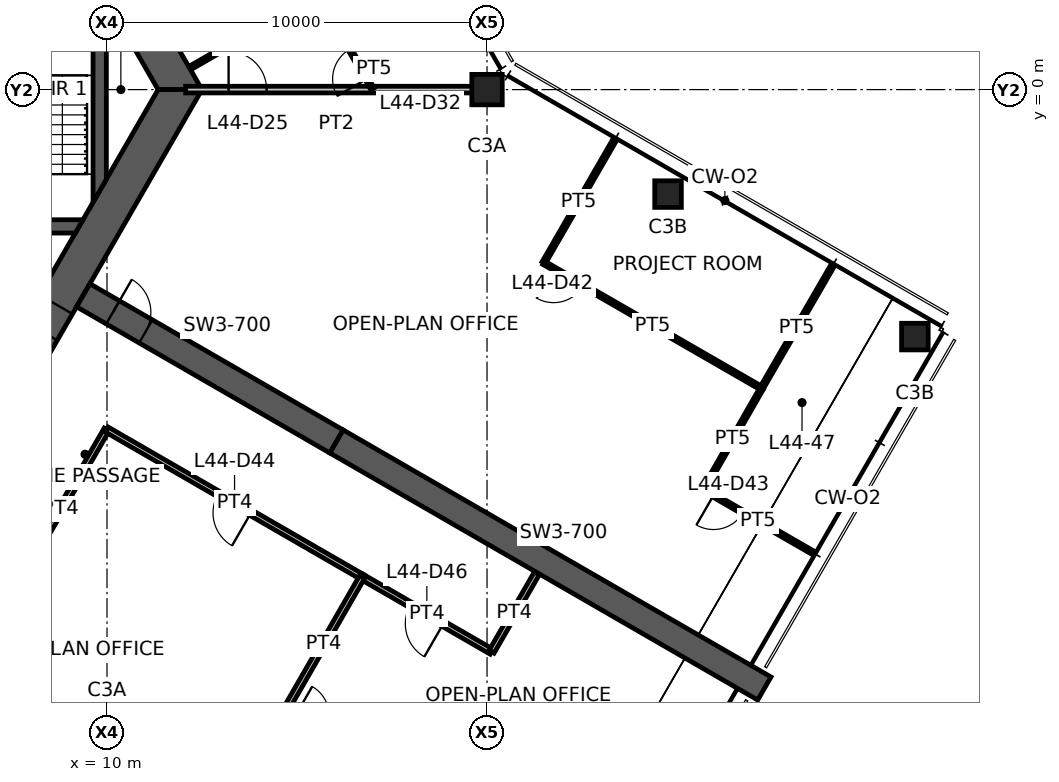
"""IFC4 building model, lengths in metres.
Left out: names, types, materials, properties, quantities, classifications, styles, units other than length and angle.
Written with IfcOpenShell. Run it as: python <this file> out.ifc"""

import sys

from ifc_helpers import new_model, si_unit, direction, frame, frame_2d, origin, origin_2d, place, context, subcontext, project, spatial, polyline, rectangle, hollow_rectangle, outline, extrude, element, fill, save


model = new_model("IFC4")
c1 = context("Model", 3, precision=1e-05, world=origin(), true_north=direction((0.0, 1.0)))
c2 = subcontext(c1, "Body", "Model", "MODEL_VIEW")
j1 = project(units=[si_unit("LENGTHUNIT", "METRE"), si_unit("PLANEANGLEUNIT", "RADIAN")], contexts=[c1])
p1 = place(None, origin())
s1 = spatial("IfcSite", under=j1, at=p1, CompositionType="ELEMENT")
p2 = place(p1, origin())
s2 = spatial("IfcBuilding", under=s1, at=p2, CompositionType="ELEMENT")
p3 = place(p2, frame((0.0, 0.0, 176.0)))
s3 = spatial("IfcBuildingStorey", under=s2, at=p3, CompositionType="ELEMENT", Elevation=176.0)
p4 = place(p3, frame((20.0, 0.0, 0.0), z_axis=(0.0, 0.0, 1.0), x_axis=(1.0, 0.0, 0.0)))
e1 = element("IfcColumn", 1, at=p4, inside=s3, PredefinedType="COLUMN", context=c2, shape_type="SweptSolid", body=[
    extrude(hollow_rectangle(XDim=0.8, YDim=0.8, WallThickness=0.045, at=origin_2d()), origin(), (0.0, 0.0, 1.0), 3.9),
])
for number, where, z_axis, x_axis in (
    (2, (24.763, -2.75, 0.0), (0.0, 0.0, 1.0), (1.0, 0.0, 0.0)),
    (3, (31.258, -6.5, 0.0), (0.0, 0.0, 1.0), (1.0, 0.0, 0.0)),
):
    element("IfcColumn", number, at=place(p3, frame(where, z_axis=z_axis, x_axis=x_axis)), inside=s3, PredefinedType="COLUMN", context=c2, shape_type="SweptSolid", body=[
        extrude(hollow_rectangle(XDim=0.7, YDim=0.7, WallThickness=0.036, at=origin_2d()), origin(), (0.0, 0.0, 1.0), 3.9),
    ])
p5 = place(p3, frame((11.922, 0.0, 0.0), z_axis=(0.0, 0.0, 1.0), x_axis=(-0.500004296715, 0.866022923061, 0.0)))
e4 = element("IfcWall", 4, at=p5, inside=s3, PredefinedType="SHEAR", context=c2, shape_type="SweptSolid", body=[
    extrude(outline(polyline([(-0.289, -0.5), (5.835, -0.5), (6.635, -0.5), (12.211, -0.5), (11.634, 0.5), (6.635, 0.5), (5.835, 0.5), (0.289, 0.5), (-0.289, -0.5)])), origin(), (0.0, 0.0, 1.0), 3.9),
])
p6 = place(p5, frame((5.835, 0.0, 0.0)))
e5 = element("IfcOpeningElement", 5, at=p6, cuts=e4, PredefinedType="OPENING", context=c2, shape_type="SweptSolid", body=[
    extrude(rectangle(XDim=0.8, YDim=2.1, at=frame_2d((0.4, 1.05))), frame((0.0, 0.51, 0.0), z_axis=(0.0, -1.0, 0.0), x_axis=(1.0, 0.0, 0.0)), (0.0, 0.0, 1.0), 1.02),
])
p7 = place(p3, frame((5.961, -10.325, 0.0), z_axis=(0.0, 0.0, 1.0), x_axis=(0.500004296715, 0.866022923061, 0.0)))
e6 = element("IfcWall", 6, at=p7, inside=s3, PredefinedType="SHEAR", context=c2, shape_type="SweptSolid", body=[
    extrude(outline(polyline([(-0.289, -0.5), (4.594, -0.5), (5.394, -0.5), (12.211, -0.5), (11.634, 0.5), (5.394, 0.5), (4.594, 0.5), (0.289, 0.5), (-0.289, -0.5)])), origin(), (0.0, 0.0, 1.0), 3.9),
])
p8 = place(p7, frame((4.594, 0.0, 0.0)))
e7 = element("IfcOpeningElement", 7, at=p8, cuts=e6, PredefinedType="OPENING", context=c2, shape_type="SweptSolid", body=[
    extrude(rectangle(XDim=0.8, YDim=2.1, at=frame_2d((0.4, 1.05))), frame((0.0, 0.51, 0.0), z_axis=(0.0, -1.0, 0.0), x_axis=(1.0, 0.0, 0.0)), (0.0, 0.0, 1.0), 1.02),
])
p9 = place(p3, frame((9.375, -5.413, 0.0), z_axis=(0.0, 0.0, 1.0), x_axis=(0.866032377459, -0.499987921047, 0.0)))
e8 = element("IfcWall", 8, at=p9, inside=s3, PredefinedType="SHEAR", context=c2, shape_type="SweptSolid", body=[
    extrude(rectangle(XDim=7.696, YDim=0.7, at=frame_2d((3.848, 0.0))), origin(), (0.0, 0.0, 1.0), 3.9),
])
p10 = place(p9, frame((0.9, 0.0, 0.0)))
e9 = element("IfcOpeningElement", 9, at=p10, cuts=e8, PredefinedType="OPENING", context=c2, shape_type="SweptSolid", body=[
    extrude(rectangle(XDim=1.0, YDim=2.1, at=frame_2d((0.5, 1.05))), frame((0.0, 0.36, 0.0), z_axis=(0.0, -1.0, 0.0), x_axis=(1.0, 0.0, 0.0)), (0.0, 0.0, 1.0), 0.72),
])
p11 = place(p3, frame((16.039, -9.26, 0.0), z_axis=(0.0, 0.0, 1.0), x_axis=(0.866024837091, -0.50000098154, 0.0)))
e10 = element("IfcWall", 10, at=p11, inside=s3, PredefinedType="SHEAR", context=c2, shape_type="SweptSolid", body=[
    extrude(rectangle(XDim=13.0, YDim=0.7, at=frame_2d((6.5, 0.0))), origin(), (0.0, 0.0, 1.0), 3.9),
])
p12 = place(p3, frame((1.425, -3.6, 0.0), z_axis=(0.0, 0.0, 1.0), x_axis=(1.0, 0.0, 0.0)))
e11 = element("IfcWall", 11, at=p12, inside=s3, PredefinedType="SHEAR", context=c2, shape_type="SweptSolid", body=[
    extrude(outline(polyline([(0.0, -0.175), (1.075, -0.175), (2.175, -0.175), (7.74, -0.175), (7.942, 0.175), (2.175, 0.175), (1.075, 0.175), (0.0, 0.175), (0.0, -0.175)])), origin(), (0.0, 0.0, 1.0), 3.9),
])
p13 = place(p12, frame((1.075, 0.0, 0.0)))
e12 = element("IfcOpeningElement", 12, at=p13, cuts=e11, PredefinedType="OPENING", context=c2, shape_type="SweptSolid", body=[
    extrude(rectangle(XDim=1.1, YDim=2.1, at=frame_2d((0.55, 1.05))), frame((0.0, 0.185, 0.0), z_axis=(0.0, -1.0, 0.0), x_axis=(1.0, 0.0, 0.0)), (0.0, 0.0, 1.0), 0.37),
])
p14 = place(p3, frame((9.808, -2.662, 0.0), z_axis=(0.0, 0.0, 1.0), x_axis=(0.0, 1.0, 0.0)))
e13 = element("IfcWall", 13, at=p14, inside=s3, PredefinedType="SHEAR", context=c2, shape_type="SweptSolid", body=[
    extrude(outline(polyline([(0.303, -0.175), (5.021, -0.175), (5.628, 0.175), (-0.303, 0.175), (0.303, -0.175)])), origin(), (0.0, 0.0, 1.0), 3.9),
])
p15 = place(p3, frame((12.07, 0.0, 0.0), z_axis=(0.0, 0.0, 1.0), x_axis=(1.0, 0.0, 0.0)))
e14 = element("IfcWall", 14, at=p15, inside=s3, PredefinedType="PARTITIONING", context=c2, shape_type="SweptSolid", body=[
    extrude(rectangle(XDim=7.93, YDim=0.175, at=frame_2d((3.965, 0.0))), origin(), (0.0, 0.0, 1.0), 3.05),
])
p16 = place(p15, frame((1.13, 0.0, 0.0)))
e15 = element("IfcOpeningElement", 15, at=p16, cuts=e14, PredefinedType="OPENING", context=c2, shape_type="SweptSolid", body=[
    extrude(rectangle(XDim=1.0, YDim=2.1, at=frame_2d((0.5, 1.05))), frame((0.0, 0.098, 0.0), z_axis=(0.0, -1.0, 0.0), x_axis=(1.0, 0.0, 0.0)), (0.0, 0.0, 1.0), 0.195),
])
p17 = place(p3, frame((14.427, 1.863, 0.0), z_axis=(0.0, 0.0, 1.0), x_axis=(-0.866045356598, -0.49996543912, 0.0)))
e16 = element("IfcWall", 16, at=p17, inside=s3, PredefinedType="PARTITIONING", context=c2, shape_type="SweptSolid", body=[
    extrude(rectangle(XDim=2.58, YDim=0.1, at=frame_2d((1.29, 0.0))), origin(), (0.0, 0.0, 1.0), 2.95),
])
p18 = place(p3, frame((16.986, 0.02, 0.0), z_axis=(0.0, 0.0, 1.0), x_axis=(-0.498096123952, 0.867121820337, 0.0)))
e17 = element("IfcWall", 17, at=p18, inside=s3, PredefinedType="PARTITIONING", context=c2, shape_type="SweptSolid", body=[
    extrude(rectangle(XDim=2.067, YDim=0.1, at=frame_2d((1.034, 0.0))), origin(), (0.0, 0.0, 1.0), 2.95),
])
p19 = place(p18, frame((0.3, 0.0, 0.0)))
e18 = element("IfcOpeningElement", 18, at=p19, cuts=e17, PredefinedType="OPENING", context=c2, shape_type="SweptSolid", body=[
    extrude(rectangle(XDim=0.9, YDim=2.1, at=frame_2d((0.45, 1.05))), frame((0.0, 0.06, 0.0), z_axis=(0.0, -1.0, 0.0), x_axis=(1.0, 0.0, 0.0)), (0.0, 0.0, 1.0), 0.12),
])
p20 = place(p3, frame((29.077, -4.658, 0.0), z_axis=(0.0, 0.0, 1.0), x_axis=(-0.501275229052, -0.865287897026, 0.0)))
e19 = element("IfcWall", 19, at=p20, inside=s3, PredefinedType="PARTITIONING", context=c2, shape_type="SweptSolid", body=[
    extrude(rectangle(XDim=3.705, YDim=0.1, at=frame_2d((1.853, 0.0))), origin(), (0.0, 0.0, 1.0), 2.95),
])
p21 = place(p3, frame((21.492, -4.557, 0.0), z_axis=(0.0, 0.0, 1.0), x_axis=(0.500013413428, 0.866017659399, 0.0)))
e20 = element("IfcWall", 20, at=p21, inside=s3, PredefinedType="PARTITIONING", context=c2, shape_type="SweptSolid", body=[
    extrude(rectangle(XDim=3.68, YDim=0.1, at=frame_2d((1.84, 0.0))), origin(), (0.0, 0.0, 1.0), 2.95),
])
p22 = place(p3, frame((27.227, -7.863, 0.0), z_axis=(0.0, 0.0, 1.0), x_axis=(-0.866343956507, 0.499447844147, 0.0)))
e21 = element("IfcWall", 21, at=p22, inside=s3, PredefinedType="PARTITIONING", context=c2, shape_type="SweptSolid", body=[
    extrude(rectangle(XDim=6.62, YDim=0.1, at=frame_2d((3.31, 0.0))), origin(), (0.0, 0.0, 1.0), 2.95),
])
p23 = place(p22, frame((5.42, 0.0, 0.0)))
e22 = element("IfcOpeningElement", 22, at=p23, cuts=e21, PredefinedType="OPENING", context=c2, shape_type="SweptSolid", body=[
    extrude(rectangle(XDim=0.9, YDim=2.1, at=frame_2d((0.45, 1.05))), frame((0.0, 0.06, 0.0), z_axis=(0.0, -1.0, 0.0), x_axis=(1.0, 0.0, 0.0)), (0.0, 0.0, 1.0), 0.12),
])
p24 = place(p3, frame((25.7, -10.527, 0.0), z_axis=(0.0, 0.0, 1.0), x_axis=(0.497097650811, 0.867694603855, 0.0)))
e23 = element("IfcWall", 23, at=p24, inside=s3, PredefinedType="PARTITIONING", context=c2, shape_type="SweptSolid", body=[
    extrude(rectangle(XDim=3.071, YDim=0.1, at=frame_2d((1.535, 0.0))), origin(), (0.0, 0.0, 1.0), 2.95),
])
p25 = place(p3, frame((28.562, -12.18, 0.0), z_axis=(0.0, 0.0, 1.0), x_axis=(-0.866020751647, 0.500008057651, 0.0)))
e24 = element("IfcWall", 24, at=p25, inside=s3, PredefinedType="PARTITIONING", context=c2, shape_type="SweptSolid", body=[
    extrude(rectangle(XDim=3.305, YDim=0.1, at=frame_2d((1.653, 0.0))), origin(), (0.0, 0.0, 1.0), 2.95),
])
p26 = place(p25, frame((2.105, 0.0, 0.0)))
e25 = element("IfcOpeningElement", 25, at=p26, cuts=e24, PredefinedType="OPENING", context=c2, shape_type="SweptSolid", body=[
    extrude(rectangle(XDim=0.9, YDim=2.1, at=frame_2d((0.45, 1.05))), frame((0.0, 0.06, 0.0), z_axis=(0.0, -1.0, 0.0), x_axis=(1.0, 0.0, 0.0)), (0.0, 0.0, 1.0), 0.12),
])
p27 = place(p3, frame((9.992, -8.944, 0.0), z_axis=(0.0, 0.0, 1.0), x_axis=(-0.500033248206, -0.866006207073, 0.0)))
e26 = element("IfcWall", 26, at=p27, inside=s3, PredefinedType="PARTITIONING", context=c2, shape_type="SweptSolid", body=[
    extrude(rectangle(XDim=4.828, YDim=0.15, at=frame_2d((2.414, 0.0))), origin(), (0.0, 0.0, 1.0), 2.95),
])
p28 = place(p3, frame((16.721, -12.83, 0.0), z_axis=(0.0, 0.0, 1.0), x_axis=(-0.866020780657, 0.500008007406, 0.0)))
e27 = element("IfcWall", 27, at=p28, inside=s3, PredefinedType="PARTITIONING", context=c2, shape_type="SweptSolid", body=[
    extrude(rectangle(XDim=7.771, YDim=0.15, at=frame_2d((3.885, 0.0))), origin(), (0.0, 0.0, 1.0), 2.95),
])
p29 = place(p28, frame((3.385, 0.0, 0.0)))
e28 = element("IfcOpeningElement", 28, at=p29, cuts=e27, PredefinedType="OPENING", context=c2, shape_type="SweptSolid", body=[
    extrude(rectangle(XDim=1.0, YDim=2.1, at=frame_2d((0.5, 1.05))), frame((0.0, 0.085, 0.0), z_axis=(0.0, -1.0, 0.0), x_axis=(1.0, 0.0, 0.0)), (0.0, 0.0, 1.0), 0.17),
])
p30 = place(p3, frame((20.12, -14.792, 0.0), z_axis=(0.0, 0.0, 1.0), x_axis=(-0.866038848349, 0.499976712608, 0.0)))
e29 = element("IfcWall", 29, at=p30, inside=s3, PredefinedType="PARTITIONING", context=c2, shape_type="SweptSolid", body=[
    extrude(rectangle(XDim=3.934, YDim=0.15, at=frame_2d((1.967, 0.0))), origin(), (0.0, 0.0, 1.0), 2.95),
])
p31 = place(p30, frame((1.467, 0.0, 0.0)))
e30 = element("IfcOpeningElement", 30, at=p31, cuts=e29, PredefinedType="OPENING", context=c2, shape_type="SweptSolid", body=[
    extrude(rectangle(XDim=1.0, YDim=2.1, at=frame_2d((0.5, 1.05))), frame((0.0, 0.085, 0.0), z_axis=(0.0, -1.0, 0.0), x_axis=(1.0, 0.0, 0.0)), (0.0, 0.0, 1.0), 0.17),
])
p32 = place(p3, frame((21.31, -12.731, 0.0), z_axis=(0.0, 0.0, 1.0), x_axis=(-0.500077627542, -0.865980580863, 0.0)))
e31 = element("IfcWall", 31, at=p32, inside=s3, PredefinedType="PARTITIONING", context=c2, shape_type="SweptSolid", body=[
    extrude(rectangle(XDim=2.38, YDim=0.15, at=frame_2d((1.19, 0.0))), origin(), (0.0, 0.0, 1.0), 2.95),
])
p33 = place(p3, frame((16.713, -12.825, 0.0), z_axis=(0.0, 0.0, 1.0), x_axis=(-0.498976779382, -0.866615355067, 0.0)))
e32 = element("IfcWall", 32, at=p33, inside=s3, PredefinedType="PARTITIONING", context=c2, shape_type="SweptSolid", body=[
    extrude(rectangle(XDim=4.054, YDim=0.15, at=frame_2d((2.027, 0.0))), origin(), (0.0, 0.0, 1.0), 2.95),
])
p34 = place(p8, origin())
e33 = element("IfcDoor", 33, at=p34, inside=s3, OperationType="SINGLE_SWING_LEFT", PredefinedType="DOOR", context=c2, shape_type="SweptSolid", body=[
    extrude(rectangle(XDim=0.8, YDim=2.1, at=frame_2d((0.4, 1.05))), frame((0.0, 0.025, 0.0), z_axis=(0.0, -1.0, 0.0), x_axis=(1.0, 0.0, 0.0)), (0.0, 0.0, 1.0), 0.05),
])
fill(e7, e33)
p35 = place(p10, origin())
e34 = element("IfcDoor", 34, at=p35, inside=s3, OperationType="SINGLE_SWING_LEFT", PredefinedType="DOOR", context=c2, shape_type="SweptSolid", body=[
    extrude(rectangle(XDim=1.0, YDim=2.1, at=frame_2d((0.5, 1.05))), frame((0.0, 0.025, 0.0), z_axis=(0.0, -1.0, 0.0), x_axis=(1.0, 0.0, 0.0)), (0.0, 0.0, 1.0), 0.05),
])
fill(e9, e34)
p36 = place(p16, origin())
e35 = element("IfcDoor", 35, at=p36, inside=s3, OperationType="SINGLE_SWING_LEFT", PredefinedType="DOOR", context=c2, shape_type="SweptSolid", body=[
    extrude(rectangle(XDim=1.0, YDim=2.1, at=frame_2d((0.5, 1.05))), frame((0.0, 0.025, 0.0), z_axis=(0.0, -1.0, 0.0), x_axis=(1.0, 0.0, 0.0)), (0.0, 0.0, 1.0), 0.05),
])
fill(e15, e35)
p37 = place(p19, origin())
e36 = element("IfcDoor", 36, at=p37, inside=s3, OperationType="SINGLE_SWING_LEFT", PredefinedType="DOOR", context=c2, shape_type="SweptSolid", body=[
    extrude(rectangle(XDim=0.9, YDim=2.1, at=frame_2d((0.45, 1.05))), frame((0.0, 0.025, 0.0), z_axis=(0.0, -1.0, 0.0), x_axis=(1.0, 0.0, 0.0)), (0.0, 0.0, 1.0), 0.05),
])
fill(e18, e36)
p38 = place(p23, origin())
e37 = element("IfcDoor", 37, at=p38, inside=s3, OperationType="SINGLE_SWING_RIGHT", PredefinedType="DOOR", context=c2, shape_type="SweptSolid", body=[
    extrude(rectangle(XDim=0.9, YDim=2.1, at=frame_2d((0.45, 1.05))), frame((0.0, 0.025, 0.0), z_axis=(0.0, -1.0, 0.0), x_axis=(1.0, 0.0, 0.0)), (0.0, 0.0, 1.0), 0.05),
])
fill(e22, e37)
p39 = place(p26, origin())
e38 = element("IfcDoor", 38, at=p39, inside=s3, OperationType="SINGLE_SWING_RIGHT", PredefinedType="DOOR", context=c2, shape_type="SweptSolid", body=[
    extrude(rectangle(XDim=0.9, YDim=2.1, at=frame_2d((0.45, 1.05))), frame((0.0, 0.025, 0.0), z_axis=(0.0, -1.0, 0.0), x_axis=(1.0, 0.0, 0.0)), (0.0, 0.0, 1.0), 0.05),
])
fill(e25, e38)
p40 = place(p29, origin())
e39 = element("IfcDoor", 39, at=p40, inside=s3, OperationType="SINGLE_SWING_LEFT", PredefinedType="DOOR", context=c2, shape_type="SweptSolid", body=[
    extrude(rectangle(XDim=1.0, YDim=2.1, at=frame_2d((0.5, 1.05))), frame((0.0, 0.025, 0.0), z_axis=(0.0, -1.0, 0.0), x_axis=(1.0, 0.0, 0.0)), (0.0, 0.0, 1.0), 0.05),
])
fill(e28, e39)
p41 = place(p31, origin())
e40 = element("IfcDoor", 40, at=p41, inside=s3, OperationType="SINGLE_SWING_LEFT", PredefinedType="DOOR", context=c2, shape_type="SweptSolid", body=[
    extrude(rectangle(XDim=1.0, YDim=2.1, at=frame_2d((0.5, 1.05))), frame((0.0, 0.025, 0.0), z_axis=(0.0, -1.0, 0.0), x_axis=(1.0, 0.0, 0.0)), (0.0, 0.0, 1.0), 0.05),
])
fill(e30, e40)
save(model, sys.argv[1])
